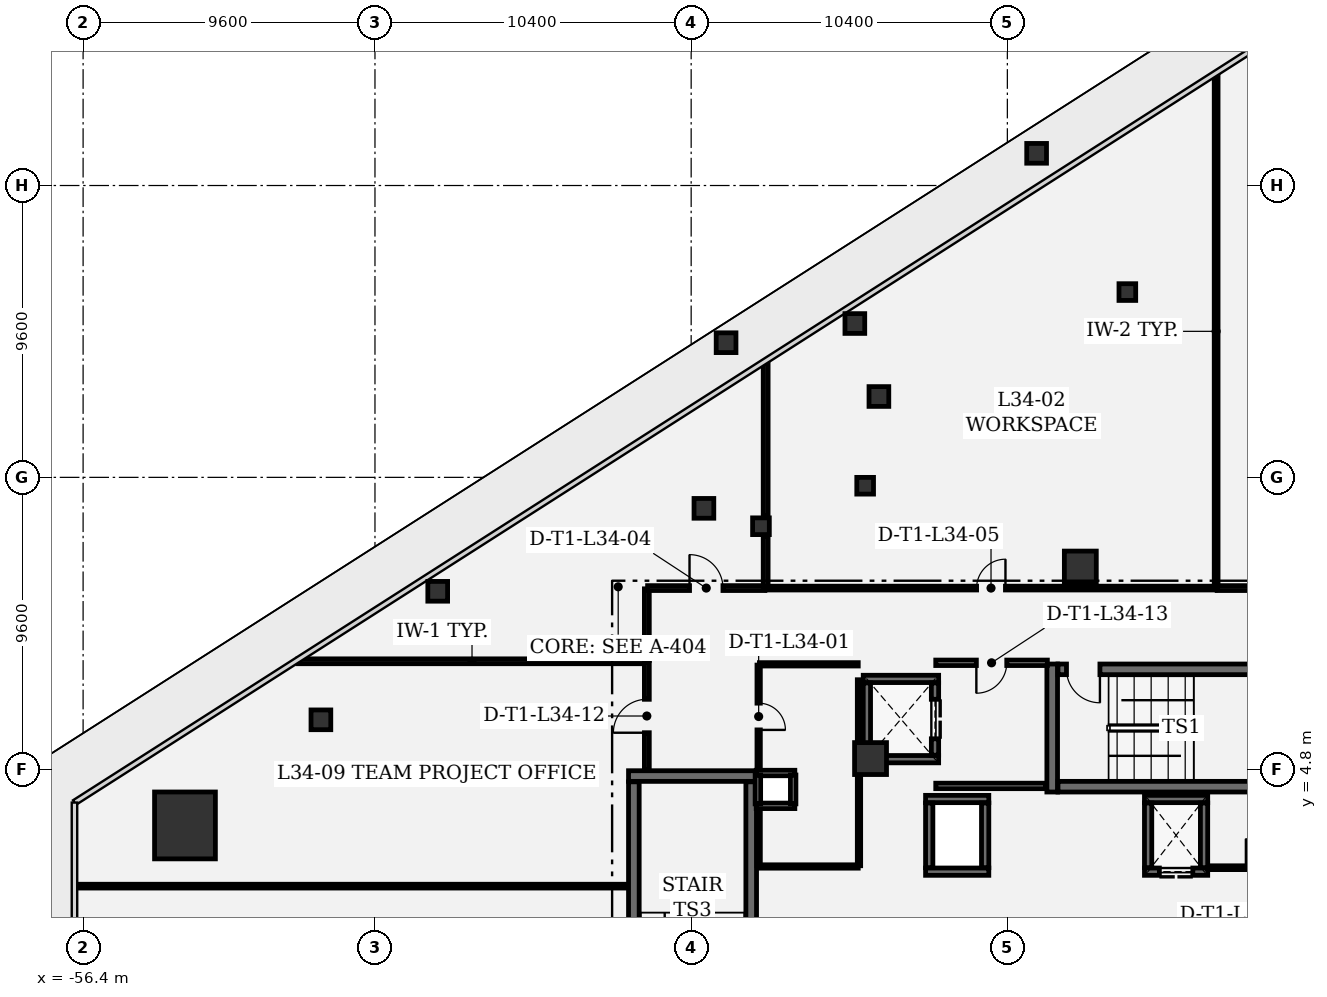
"""IFC4 building model, lengths in metres.
Left out: names, types, materials, properties, quantities, classifications, styles, units other than length and angle.
Written with IfcOpenShell. Run it as: python <this file> out.ifc"""

import sys

from ifc_helpers import new_model, si_unit, direction, frame, frame_2d, origin, origin_2d, place, context, subcontext, project, spatial, rectangle, extrude, element, fill, save


model = new_model("IFC4")
c1 = context("Model", 3, precision=1e-05, world=origin(), true_north=direction((0.0, 1.0)))
c2 = subcontext(c1, "Body", "Model", "MODEL_VIEW")
j1 = project(units=[si_unit("LENGTHUNIT", "METRE"), si_unit("PLANEANGLEUNIT", "RADIAN")], contexts=[c1])
p1 = place(None, origin())
s1 = spatial("IfcSite", under=j1, at=p1, CompositionType="ELEMENT")
p2 = place(p1, origin())
s2 = spatial("IfcBuilding", under=s1, at=p2, CompositionType="ELEMENT")
p3 = place(p2, frame((0.0, 0.0, 150.3)))
s3 = spatial("IfcBuildingStorey", under=s2, at=p3, CompositionType="ELEMENT", Elevation=150.3)
p4 = place(p3, frame((-53.049, 2.951, 0.0), z_axis=(0.0, 0.0, 1.0), x_axis=(1.0, 0.0, 0.0)))
e1 = element("IfcColumn", 1, at=p4, inside=s3, PredefinedType="COLUMN", context=c2, shape_type="SweptSolid", body=[
    extrude(rectangle(XDim=2.0, YDim=2.2, at=origin_2d()), origin(), (0.0, 0.0, 1.0), 4.05),
])
for number, where, z_axis, x_axis in (
    (2, (-23.6, 11.45, 0.0), (0.0, 0.0, 1.0), (1.0, 0.0, 0.0)),
    (3, (-30.5, 5.15, 0.0), (0.0, 0.0, 1.0), (1.0, 0.0, 0.0)),
):
    element("IfcColumn", number, at=place(p3, frame(where, z_axis=z_axis, x_axis=x_axis)), inside=s3, PredefinedType="COLUMN", context=c2, shape_type="SweptSolid", body=[
        extrude(rectangle(XDim=1.05, YDim=1.05, at=origin_2d()), origin(), (0.0, 0.0, 1.0), 4.05),
    ])
for number, where, z_axis, x_axis in (
    (4, (-35.252, 18.829, 0.0), (0.0, 0.0, 1.0), (1.0, 0.0, 0.0)),
    (5, (-25.038, 25.059, 0.0), (0.0, 0.0, 1.0), (1.0, 0.0, 0.0)),
    (6, (-31.016, 19.46, 0.0), (0.0, 0.0, 1.0), (1.0, 0.0, 0.0)),
    (7, (-44.736, 10.652, 0.0), (0.0, 0.0, 1.0), (1.0, 0.0, 0.0)),
    (8, (-48.578, 6.425, 0.0), (0.0, 0.0, 1.0), (1.0, 0.0, 0.0)),
    (9, (-35.981, 13.381, 0.0), (0.0, 0.0, 1.0), (1.0, 0.0, 0.0)),
    (10, (-30.225, 17.06, 0.0), (0.0, 0.0, 1.0), (1.0, 0.0, 0.0)),
):
    element("IfcColumn", number, at=place(p3, frame(where, z_axis=z_axis, x_axis=x_axis)), inside=s3, PredefinedType="COLUMN", context=c2, shape_type="SweptSolid", body=[
        extrude(rectangle(XDim=0.65, YDim=0.65, at=origin_2d()), origin(), (0.0, 0.0, 1.0), 4.05),
    ])
for number, where, z_axis, x_axis in (
    (11, (-34.104, 12.792, 0.0), (0.0, 0.0, 1.0), (1.0, 0.0, 0.0)),
    (12, (-22.053, 20.495, 0.0), (0.0, 0.0, 1.0), (1.0, 0.0, 0.0)),
    (13, (-30.677, 14.124, 0.0), (0.0, 0.0, 1.0), (1.0, 0.0, 0.0)),
):
    element("IfcColumn", number, at=place(p3, frame(where, z_axis=z_axis, x_axis=x_axis)), inside=s3, PredefinedType="COLUMN", context=c2, shape_type="SweptSolid", body=[
        extrude(rectangle(XDim=0.55, YDim=0.55, at=origin_2d()), origin(), (0.0, 0.0, 1.0), 4.05),
    ])
p5 = place(p3, frame((-24.525, 8.26, 0.0), z_axis=(0.0, 0.0, 1.0), x_axis=(0.0, -1.0, 0.0)))
e14 = element("IfcWall", 14, at=p5, inside=s3, PredefinedType="SHEAR", context=c2, shape_type="SweptSolid", body=[
    extrude(rectangle(XDim=4.21, YDim=0.35, at=frame_2d((2.105, 0.0))), origin(), (0.0, 0.0, 1.0), 3.78),
])
p6 = place(p3, frame((-24.335, 4.225, 0.0), z_axis=(0.0, 0.0, 1.0), x_axis=(1.0, 0.0, 0.0)))
e15 = element("IfcWall", 15, at=p6, inside=s3, PredefinedType="SHEAR", context=c2, shape_type="SweptSolid", body=[
    extrude(rectangle(XDim=8.12, YDim=0.35, at=frame_2d((4.06, 0.0))), origin(), (0.0, 0.0, 1.0), 3.78),
])
p7 = place(p3, frame((-16.215, 8.085, 0.0), z_axis=(0.0, 0.0, 1.0), x_axis=(-1.0, 0.0, 0.0)))
e16 = element("IfcWall", 16, at=p7, inside=s3, PredefinedType="SHEAR", context=c2, shape_type="SweptSolid", body=[
    extrude(rectangle(XDim=8.12, YDim=0.35, at=frame_2d((4.06, 0.0))), origin(), (0.0, 0.0, 1.0), 3.78),
])
p8 = place(p7, frame((6.74, 0.0, 0.0)))
e17 = element("IfcOpeningElement", 17, at=p8, cuts=e16, PredefinedType="OPENING", context=c2, shape_type="SweptSolid", body=[
    extrude(rectangle(XDim=1.1, YDim=2.2, at=frame_2d((0.55, 1.1))), frame((0.0, 0.185, 0.0), z_axis=(0.0, -1.0, 0.0), x_axis=(1.0, 0.0, 0.0)), (0.0, 0.0, 1.0), 0.37),
])
p9 = place(p3, frame((-34.25, 4.575, 0.0), z_axis=(0.0, 0.0, 1.0), x_axis=(-1.0, 0.0, 0.0)))
e18 = element("IfcWall", 18, at=p9, inside=s3, PredefinedType="SHEAR", context=c2, shape_type="SweptSolid", body=[
    extrude(rectangle(XDim=4.21, YDim=0.35, at=frame_2d((2.105, 0.0))), origin(), (0.0, 0.0, 1.0), 3.78),
])
for number, where, z_axis, x_axis in (
    (19, (-34.425, -4.385, 0.0), (0.0, 0.0, 1.0), (0.0, 1.0, 0.0)),
    (20, (-38.285, 4.385, 0.0), (0.0, 0.0, 1.0), (0.0, -1.0, 0.0)),
):
    element("IfcWall", number, at=place(p3, frame(where, z_axis=z_axis, x_axis=x_axis)), inside=s3, PredefinedType="SHEAR", context=c2, shape_type="SweptSolid", body=[
        extrude(rectangle(XDim=8.77, YDim=0.35, at=frame_2d((4.385, 0.0))), origin(), (0.0, 0.0, 1.0), 3.78),
    ])
for number, where, z_axis, x_axis in (
    (21, (-28.26, 5.13, 0.0), (0.0, 0.0, 1.0), (-1.0, 0.0, 0.0)),
    (22, (-30.74, 7.77, 0.0), (0.0, 0.0, 1.0), (1.0, 0.0, 0.0)),
):
    element("IfcWall", number, at=place(p3, frame(where, z_axis=z_axis, x_axis=x_axis)), inside=s3, PredefinedType="SHEAR", context=c2, shape_type="SweptSolid", body=[
        extrude(rectangle(XDim=2.48, YDim=0.24, at=frame_2d((1.24, 0.0))), origin(), (0.0, 0.0, 1.0), 3.78),
    ])
p10 = place(p3, frame((-30.62, 5.262, 0.0), z_axis=(0.0, 0.0, 1.0), x_axis=(0.0, 1.0, 0.0)))
e23 = element("IfcWall", 23, at=p10, inside=s3, PredefinedType="SHEAR", context=c2, shape_type="SweptSolid", body=[
    extrude(rectangle(XDim=2.376, YDim=0.24, at=frame_2d((1.188, 0.0))), origin(), (0.0, 0.0, 1.0), 3.78),
])
p11 = place(p3, frame((-28.38, 7.638, 0.0), z_axis=(0.0, 0.0, 1.0), x_axis=(0.0, -1.0, 0.0)))
e24 = element("IfcWall", 24, at=p11, inside=s3, PredefinedType="SHEAR", context=c2, shape_type="SweptSolid", body=[
    extrude(rectangle(XDim=2.376, YDim=0.24, at=frame_2d((1.188, 0.0))), origin(), (0.0, 0.0, 1.0), 3.78),
])
p12 = place(p11, frame((0.538, 0.0, 0.0)))
e25 = element("IfcOpeningElement", 25, at=p12, cuts=e24, PredefinedType="OPENING", context=c2, shape_type="SweptSolid", body=[
    extrude(rectangle(XDim=1.3, YDim=2.3, at=frame_2d((0.65, 1.15))), frame((0.0, 0.13, 0.0), z_axis=(0.0, -1.0, 0.0), x_axis=(1.0, 0.0, 0.0)), (0.0, 0.0, 1.0), 0.26),
])
for number, where, z_axis, x_axis in (
    (26, (-26.61, 1.43, 0.0), (0.0, 0.0, 1.0), (-1.0, 0.0, 0.0)),
    (27, (-28.69, 3.82, 0.0), (0.0, 0.0, 1.0), (1.0, 0.0, 0.0)),
):
    element("IfcWall", number, at=place(p3, frame(where, z_axis=z_axis, x_axis=x_axis)), inside=s3, PredefinedType="SHEAR", context=c2, shape_type="SweptSolid", body=[
        extrude(rectangle(XDim=2.08, YDim=0.24, at=frame_2d((1.04, 0.0))), origin(), (0.0, 0.0, 1.0), 3.78),
    ])
for number, where, z_axis, x_axis in (
    (28, (-28.57, 1.562, 0.0), (0.0, 0.0, 1.0), (0.0, 1.0, 0.0)),
    (29, (-26.73, 3.688, 0.0), (0.0, 0.0, 1.0), (0.0, -1.0, 0.0)),
):
    element("IfcWall", number, at=place(p3, frame(where, z_axis=z_axis, x_axis=x_axis)), inside=s3, PredefinedType="SHEAR", context=c2, shape_type="SweptSolid", body=[
        extrude(rectangle(XDim=2.126, YDim=0.24, at=frame_2d((1.063, 0.0))), origin(), (0.0, 0.0, 1.0), 3.78),
    ])
p13 = place(p3, frame((-19.41, 1.43, 0.0), z_axis=(0.0, 0.0, 1.0), x_axis=(-1.0, 0.0, 0.0)))
e30 = element("IfcWall", 30, at=p13, inside=s3, PredefinedType="SHEAR", context=c2, shape_type="SweptSolid", body=[
    extrude(rectangle(XDim=2.08, YDim=0.24, at=frame_2d((1.04, 0.0))), origin(), (0.0, 0.0, 1.0), 3.78),
])
p14 = place(p13, frame((0.49, 0.0, 0.0)))
e31 = element("IfcOpeningElement", 31, at=p14, cuts=e30, PredefinedType="OPENING", context=c2, shape_type="SweptSolid", body=[
    extrude(rectangle(XDim=1.1, YDim=2.2, at=frame_2d((0.55, 1.1))), frame((0.0, 0.13, 0.0), z_axis=(0.0, -1.0, 0.0), x_axis=(1.0, 0.0, 0.0)), (0.0, 0.0, 1.0), 0.26),
])
p15 = place(p3, frame((-21.49, 3.82, 0.0), z_axis=(0.0, 0.0, 1.0), x_axis=(1.0, 0.0, 0.0)))
e32 = element("IfcWall", 32, at=p15, inside=s3, PredefinedType="SHEAR", context=c2, shape_type="SweptSolid", body=[
    extrude(rectangle(XDim=2.08, YDim=0.24, at=frame_2d((1.04, 0.0))), origin(), (0.0, 0.0, 1.0), 3.78),
])
for number, where, z_axis, x_axis in (
    (33, (-21.37, 1.562, 0.0), (0.0, 0.0, 1.0), (0.0, 1.0, 0.0)),
    (34, (-19.53, 3.688, 0.0), (0.0, 0.0, 1.0), (0.0, -1.0, 0.0)),
):
    element("IfcWall", number, at=place(p3, frame(where, z_axis=z_axis, x_axis=x_axis)), inside=s3, PredefinedType="SHEAR", context=c2, shape_type="SweptSolid", body=[
        extrude(rectangle(XDim=2.126, YDim=0.24, at=frame_2d((1.063, 0.0))), origin(), (0.0, 0.0, 1.0), 3.78),
    ])
for number, where, z_axis, x_axis in (
    (35, (-32.99, 3.595, 0.0), (0.0, 0.0, 1.0), (-1.0, 0.0, 0.0)),
    (36, (-34.26, 4.675, 0.0), (0.0, 0.0, 1.0), (1.0, 0.0, 0.0)),
):
    element("IfcWall", number, at=place(p3, frame(where, z_axis=z_axis, x_axis=x_axis)), inside=s3, PredefinedType="PARTITIONING", context=c2, shape_type="SweptSolid", body=[
        extrude(rectangle(XDim=1.27, YDim=0.18, at=frame_2d((0.635, 0.0))), origin(), (0.0, 0.0, 1.0), 3.78),
    ])
for number, where, z_axis, x_axis in (
    (37, (-34.205, 3.66, 0.0), (0.0, 0.0, 1.0), (0.0, 1.0, 0.0)),
    (38, (-33.045, 4.61, 0.0), (0.0, 0.0, 1.0), (0.0, -1.0, 0.0)),
):
    element("IfcWall", number, at=place(p3, frame(where, z_axis=z_axis, x_axis=x_axis)), inside=s3, PredefinedType="PARTITIONING", context=c2, shape_type="SweptSolid", body=[
        extrude(rectangle(XDim=0.95, YDim=0.18, at=frame_2d((0.475, 0.0))), origin(), (0.0, 0.0, 1.0), 3.78),
    ])
p16 = place(p3, frame((-28.355, 4.25, 0.0), z_axis=(0.0, 0.0, 1.0), x_axis=(1.0, 0.0, 0.0)))
e39 = element("IfcWall", 39, at=p16, inside=s3, PredefinedType="PARTITIONING", context=c2, shape_type="SweptSolid", body=[
    extrude(rectangle(XDim=3.622, YDim=0.18, at=frame_2d((1.811, 0.0))), origin(), (0.0, 0.0, 1.0), 3.78),
])
p17 = place(p3, frame((-24.684, 8.3, 0.0), z_axis=(0.0, 0.0, 1.0), x_axis=(-1.0, 0.0, 0.0)))
e40 = element("IfcWall", 40, at=p17, inside=s3, PredefinedType="PARTITIONING", context=c2, shape_type="SweptSolid", body=[
    extrude(rectangle(XDim=3.671, YDim=0.18, at=frame_2d((1.835, 0.0))), origin(), (0.0, 0.0, 1.0), 3.78),
])
p18 = place(p17, frame((1.335, 0.0, 0.0)))
e41 = element("IfcOpeningElement", 41, at=p18, cuts=e40, PredefinedType="OPENING", context=c2, shape_type="SweptSolid", body=[
    extrude(rectangle(XDim=1.0, YDim=2.15, at=frame_2d((0.5, 1.075))), frame((0.0, 0.1, 0.0), z_axis=(0.0, -1.0, 0.0), x_axis=(1.0, 0.0, 0.0)), (0.0, 0.0, 1.0), 0.2),
])
p19 = place(p3, frame((-34.155, 1.6, 0.0), z_axis=(0.0, 0.0, 1.0), x_axis=(1.0, 0.0, 0.0)))
e42 = element("IfcWall", 42, at=p19, inside=s3, PredefinedType="PARTITIONING", context=c2, shape_type="SweptSolid", body=[
    extrude(rectangle(XDim=3.25, YDim=0.11, at=frame_2d((1.625, 0.0))), origin(), (0.0, 0.0, 1.0), 3.78),
])
p20 = place(p3, frame((-30.88, 1.625, 0.0), z_axis=(0.0, 0.0, 1.0), x_axis=(0.0, 1.0, 0.0)))
e43 = element("IfcWall", 43, at=p20, inside=s3, PredefinedType="PARTITIONING", context=c2, shape_type="SweptSolid", body=[
    extrude(rectangle(XDim=2.935, YDim=0.11, at=frame_2d((1.468, 0.0))), origin(), (0.0, 0.0, 1.0), 3.78),
])
p21 = place(p3, frame((-30.88, 5.74, 0.0), z_axis=(0.0, 0.0, 1.0), x_axis=(0.0, 1.0, 0.0)))
e44 = element("IfcWall", 44, at=p21, inside=s3, PredefinedType="PARTITIONING", context=c2, shape_type="SweptSolid", body=[
    extrude(rectangle(XDim=2.003, YDim=0.11, at=frame_2d((1.001, 0.0))), origin(), (0.0, 0.0, 1.0), 3.78),
])
p22 = place(p3, frame((-30.905, 8.25, 0.0), z_axis=(0.0, 0.0, 1.0), x_axis=(-1.0, 0.0, 0.0)))
e45 = element("IfcWall", 45, at=p22, inside=s3, PredefinedType="PARTITIONING", context=c2, shape_type="SweptSolid", body=[
    extrude(rectangle(XDim=3.25, YDim=0.11, at=frame_2d((1.625, 0.0))), origin(), (0.0, 0.0, 1.0), 3.78),
])
p23 = place(p3, frame((-34.18, 8.225, 0.0), z_axis=(0.0, 0.0, 1.0), x_axis=(0.0, -1.0, 0.0)))
e46 = element("IfcWall", 46, at=p23, inside=s3, PredefinedType="PARTITIONING", context=c2, shape_type="SweptSolid", body=[
    extrude(rectangle(XDim=3.385, YDim=0.11, at=frame_2d((1.692, 0.0))), origin(), (0.0, 0.0, 1.0), 3.78),
])
p24 = place(p23, frame((1.252, 0.0, 0.0)))
e47 = element("IfcOpeningElement", 47, at=p24, cuts=e46, PredefinedType="OPENING", context=c2, shape_type="SweptSolid", body=[
    extrude(rectangle(XDim=0.88, YDim=2.1, at=frame_2d((0.44, 1.05))), frame((0.0, 0.065, 0.0), z_axis=(0.0, -1.0, 0.0), x_axis=(1.0, 0.0, 0.0)), (0.0, 0.0, 1.0), 0.13),
])
p25 = place(p3, frame((-34.18, 3.43, 0.0), z_axis=(0.0, 0.0, 1.0), x_axis=(0.0, -1.0, 0.0)))
e48 = element("IfcWall", 48, at=p25, inside=s3, PredefinedType="PARTITIONING", context=c2, shape_type="SweptSolid", body=[
    extrude(rectangle(XDim=1.805, YDim=0.11, at=frame_2d((0.902, 0.0))), origin(), (0.0, 0.0, 1.0), 3.78),
])
p26 = place(p3, frame((-19.334, 1.56, 0.0), z_axis=(0.0, 0.0, 1.0), x_axis=(1.0, 0.0, 0.0)))
e49 = element("IfcWall", 49, at=p26, inside=s3, PredefinedType="PARTITIONING", context=c2, shape_type="SweptSolid", body=[
    extrude(rectangle(XDim=3.309, YDim=0.125, at=frame_2d((1.654, 0.0))), origin(), (0.0, 0.0, 1.0), 3.78),
])
p27 = place(p26, frame((1.179, 0.0, 0.0)))
e50 = element("IfcOpeningElement", 50, at=p27, cuts=e49, PredefinedType="OPENING", context=c2, shape_type="SweptSolid", body=[
    extrude(rectangle(XDim=0.95, YDim=2.15, at=frame_2d((0.475, 1.075))), frame((0.0, 0.073, 0.0), z_axis=(0.0, -1.0, 0.0), x_axis=(1.0, 0.0, 0.0)), (0.0, 0.0, 1.0), 0.145),
])
p28 = place(p3, frame((-49.333, 8.35, 0.0), z_axis=(0.0, 0.0, 1.0), x_axis=(1.0, 0.0, 0.0)))
e51 = element("IfcWall", 51, at=p28, inside=s3, PredefinedType="PARTITIONING", context=c2, shape_type="SweptSolid", body=[
    extrude(rectangle(XDim=11.45, YDim=0.16, at=frame_2d((5.725, 0.0))), origin(), (0.0, 0.0, 1.0), 2.9),
])
p29 = place(p3, frame((-37.858, 8.375, 0.0), z_axis=(0.0, 0.0, 1.0), x_axis=(0.0, 1.0, 0.0)))
e52 = element("IfcWall", 52, at=p29, inside=s3, PredefinedType="PARTITIONING", context=c2, shape_type="SweptSolid", body=[
    extrude(rectangle(XDim=2.358, YDim=0.16, at=frame_2d((1.179, 0.0))), origin(), (0.0, 0.0, 1.0), 3.78),
])
p30 = place(p3, frame((-37.833, 10.758, 0.0), z_axis=(0.0, 0.0, 1.0), x_axis=(1.0, 0.0, 0.0)))
e53 = element("IfcWall", 53, at=p30, inside=s3, PredefinedType="PARTITIONING", context=c2, shape_type="SweptSolid", body=[
    extrude(rectangle(XDim=3.858, YDim=0.16, at=frame_2d((1.929, 0.0))), origin(), (0.0, 0.0, 1.0), 3.344),
])
p31 = place(p30, frame((1.379, 0.0, 0.0)))
e54 = element("IfcOpeningElement", 54, at=p31, cuts=e53, PredefinedType="OPENING", context=c2, shape_type="SweptSolid", body=[
    extrude(rectangle(XDim=1.1, YDim=2.15, at=frame_2d((0.55, 1.075))), frame((0.0, 0.09, 0.0), z_axis=(0.0, -1.0, 0.0), x_axis=(1.0, 0.0, 0.0)), (0.0, 0.0, 1.0), 0.18),
])
p32 = place(p3, frame((-33.95, 10.783, 0.0), z_axis=(0.0, 0.0, 1.0), x_axis=(0.0, 1.0, 0.0)))
e55 = element("IfcWall", 55, at=p32, inside=s3, PredefinedType="PARTITIONING", context=c2, shape_type="SweptSolid", body=[
    extrude(rectangle(XDim=1.669, YDim=0.16, at=frame_2d((0.834, 0.0))), origin(), (0.0, 0.0, 1.0), 3.78),
])
p33 = place(p3, frame((-33.95, 13.133, 0.0), z_axis=(0.0, 0.0, 1.0), x_axis=(0.0, 1.0, 0.0)))
e56 = element("IfcWall", 56, at=p33, inside=s3, PredefinedType="PARTITIONING", context=c2, shape_type="SweptSolid", body=[
    extrude(rectangle(XDim=5.021, YDim=0.16, at=frame_2d((2.51, 0.0))), origin(), (0.0, 0.0, 1.0), 3.78),
])
p34 = place(p3, frame((-33.917, 10.758, 0.0), z_axis=(0.0, 0.0, 1.0), x_axis=(1.0, 0.0, 0.0)))
e57 = element("IfcWall", 57, at=p34, inside=s3, PredefinedType="PARTITIONING", context=c2, shape_type="SweptSolid", body=[
    extrude(rectangle(XDim=14.759, YDim=0.125, at=frame_2d((7.379, 0.0))), origin(), (0.0, 0.0, 1.0), 3.78),
])
p35 = place(p34, frame((6.905, 0.0, 0.0)))
e58 = element("IfcOpeningElement", 58, at=p35, cuts=e57, PredefinedType="OPENING", context=c2, shape_type="SweptSolid", body=[
    extrude(rectangle(XDim=0.95, YDim=2.15, at=frame_2d((0.475, 1.075))), frame((0.0, 0.073, 0.0), z_axis=(0.0, -1.0, 0.0), x_axis=(1.0, 0.0, 0.0)), (0.0, 0.0, 1.0), 0.145),
])
p36 = place(p3, frame((-19.133, 10.783, 0.0), z_axis=(0.0, 0.0, 1.0), x_axis=(0.0, 1.0, 0.0)))
e59 = element("IfcWall", 59, at=p36, inside=s3, PredefinedType="PARTITIONING", context=c2, shape_type="SweptSolid", body=[
    extrude(rectangle(XDim=16.84, YDim=0.125, at=frame_2d((8.42, 0.0))), origin(), (0.0, 0.0, 1.0), 2.895),
])
p37 = place(p3, frame((-19.1, 10.758, 0.0), z_axis=(0.0, 0.0, 1.0), x_axis=(1.0, 0.0, 0.0)))
e60 = element("IfcWall", 60, at=p37, inside=s3, PredefinedType="PARTITIONING", context=c2, shape_type="SweptSolid", body=[
    extrude(rectangle(XDim=8.467, YDim=0.16, at=frame_2d((4.233, 0.0))), origin(), (0.0, 0.0, 1.0), 2.895),
])
p38 = place(p3, frame((-38.493, 0.953, 0.0), z_axis=(0.0, 0.0, 1.0), x_axis=(-1.0, 0.0, 0.0)))
e61 = element("IfcWall", 61, at=p38, inside=s3, PredefinedType="PARTITIONING", context=c2, shape_type="SweptSolid", body=[
    extrude(rectangle(XDim=18.111, YDim=0.125, at=frame_2d((9.055, 0.0))), origin(), (0.0, 0.0, 1.0), 3.78),
])
p39 = place(p3, frame((-37.858, 4.783, 0.0), z_axis=(0.0, 0.0, 1.0), x_axis=(0.0, 1.0, 0.0)))
e62 = element("IfcWall", 62, at=p39, inside=s3, PredefinedType="PARTITIONING", context=c2, shape_type="SweptSolid", body=[
    extrude(rectangle(XDim=3.534, YDim=0.16, at=frame_2d((1.767, 0.0))), origin(), (0.0, 0.0, 1.0), 3.78),
])
p40 = place(p39, frame((1.217, 0.0, 0.0)))
e63 = element("IfcOpeningElement", 63, at=p40, cuts=e62, PredefinedType="OPENING", context=c2, shape_type="SweptSolid", body=[
    extrude(rectangle(XDim=1.1, YDim=2.15, at=frame_2d((0.55, 1.075))), frame((0.0, 0.09, 0.0), z_axis=(0.0, -1.0, 0.0), x_axis=(1.0, 0.0, 0.0)), (0.0, 0.0, 1.0), 0.18),
])
p41 = place(p8, origin())
e64 = element("IfcDoor", 64, at=p41, inside=s3, OperationType="SINGLE_SWING_LEFT", PredefinedType="DOOR", context=c2, shape_type="SweptSolid", body=[
    extrude(rectangle(XDim=1.1, YDim=2.2, at=frame_2d((0.55, 1.1))), frame((0.0, 0.025, 0.0), z_axis=(0.0, -1.0, 0.0), x_axis=(1.0, 0.0, 0.0)), (0.0, 0.0, 1.0), 0.05),
])
fill(e17, e64)
p42 = place(p12, origin())
e65 = element("IfcDoor", 65, at=p42, inside=s3, OperationType="DOUBLE_DOOR_SLIDING", PredefinedType="DOOR", context=c2, shape_type="SweptSolid", body=[
    extrude(rectangle(XDim=1.3, YDim=2.3, at=frame_2d((0.65, 1.15))), frame((0.0, 0.025, 0.0), z_axis=(0.0, -1.0, 0.0), x_axis=(1.0, 0.0, 0.0)), (0.0, 0.0, 1.0), 0.05),
])
fill(e25, e65)
p43 = place(p14, origin())
e66 = element("IfcDoor", 66, at=p43, inside=s3, OperationType="DOUBLE_DOOR_SLIDING", PredefinedType="DOOR", context=c2, shape_type="SweptSolid", body=[
    extrude(rectangle(XDim=1.1, YDim=2.2, at=frame_2d((0.55, 1.1))), frame((0.0, 0.025, 0.0), z_axis=(0.0, -1.0, 0.0), x_axis=(1.0, 0.0, 0.0)), (0.0, 0.0, 1.0), 0.05),
])
fill(e31, e66)
p44 = place(p24, origin())
e67 = element("IfcDoor", 67, at=p44, inside=s3, OperationType="SINGLE_SWING_RIGHT", PredefinedType="DOOR", context=c2, shape_type="SweptSolid", body=[
    extrude(rectangle(XDim=0.88, YDim=2.1, at=frame_2d((0.44, 1.05))), frame((0.0, 0.025, 0.0), z_axis=(0.0, -1.0, 0.0), x_axis=(1.0, 0.0, 0.0)), (0.0, 0.0, 1.0), 0.05),
])
fill(e47, e67)
p45 = place(p27, origin())
e68 = element("IfcDoor", 68, at=p45, inside=s3, OperationType="SINGLE_SWING_LEFT", PredefinedType="DOOR", context=c2, shape_type="SweptSolid", body=[
    extrude(rectangle(XDim=0.95, YDim=2.15, at=frame_2d((0.475, 1.075))), frame((0.0, 0.025, 0.0), z_axis=(0.0, -1.0, 0.0), x_axis=(1.0, 0.0, 0.0)), (0.0, 0.0, 1.0), 0.05),
])
fill(e50, e68)
p46 = place(p31, origin())
e69 = element("IfcDoor", 69, at=p46, inside=s3, OperationType="SINGLE_SWING_LEFT", PredefinedType="DOOR", context=c2, shape_type="SweptSolid", body=[
    extrude(rectangle(XDim=1.1, YDim=2.15, at=frame_2d((0.55, 1.075))), frame((0.0, 0.025, 0.0), z_axis=(0.0, -1.0, 0.0), x_axis=(1.0, 0.0, 0.0)), (0.0, 0.0, 1.0), 0.05),
])
fill(e54, e69)
p47 = place(p35, origin())
e70 = element("IfcDoor", 70, at=p47, inside=s3, OperationType="SINGLE_SWING_RIGHT", PredefinedType="DOOR", context=c2, shape_type="SweptSolid", body=[
    extrude(rectangle(XDim=0.95, YDim=2.15, at=frame_2d((0.475, 1.075))), frame((0.0, 0.025, 0.0), z_axis=(0.0, -1.0, 0.0), x_axis=(1.0, 0.0, 0.0)), (0.0, 0.0, 1.0), 0.05),
])
fill(e58, e70)
p48 = place(p40, origin())
e71 = element("IfcDoor", 71, at=p48, inside=s3, OperationType="SINGLE_SWING_LEFT", PredefinedType="DOOR", context=c2, shape_type="SweptSolid", body=[
    extrude(rectangle(XDim=1.1, YDim=2.15, at=frame_2d((0.55, 1.075))), frame((0.0, 0.025, 0.0), z_axis=(0.0, -1.0, 0.0), x_axis=(1.0, 0.0, 0.0)), (0.0, 0.0, 1.0), 0.05),
])
fill(e63, e71)
p49 = place(p18, origin())
e72 = element("IfcDoor", 72, at=p49, inside=s3, OperationType="SINGLE_SWING_RIGHT", PredefinedType="DOOR", context=c2, shape_type="SweptSolid", body=[
    extrude(rectangle(XDim=1.0, YDim=2.15, at=frame_2d((0.5, 1.075))), frame((0.0, 0.025, 0.0), z_axis=(0.0, -1.0, 0.0), x_axis=(1.0, 0.0, 0.0)), (0.0, 0.0, 1.0), 0.05),
])
fill(e41, e72)
save(model, sys.argv[1])
